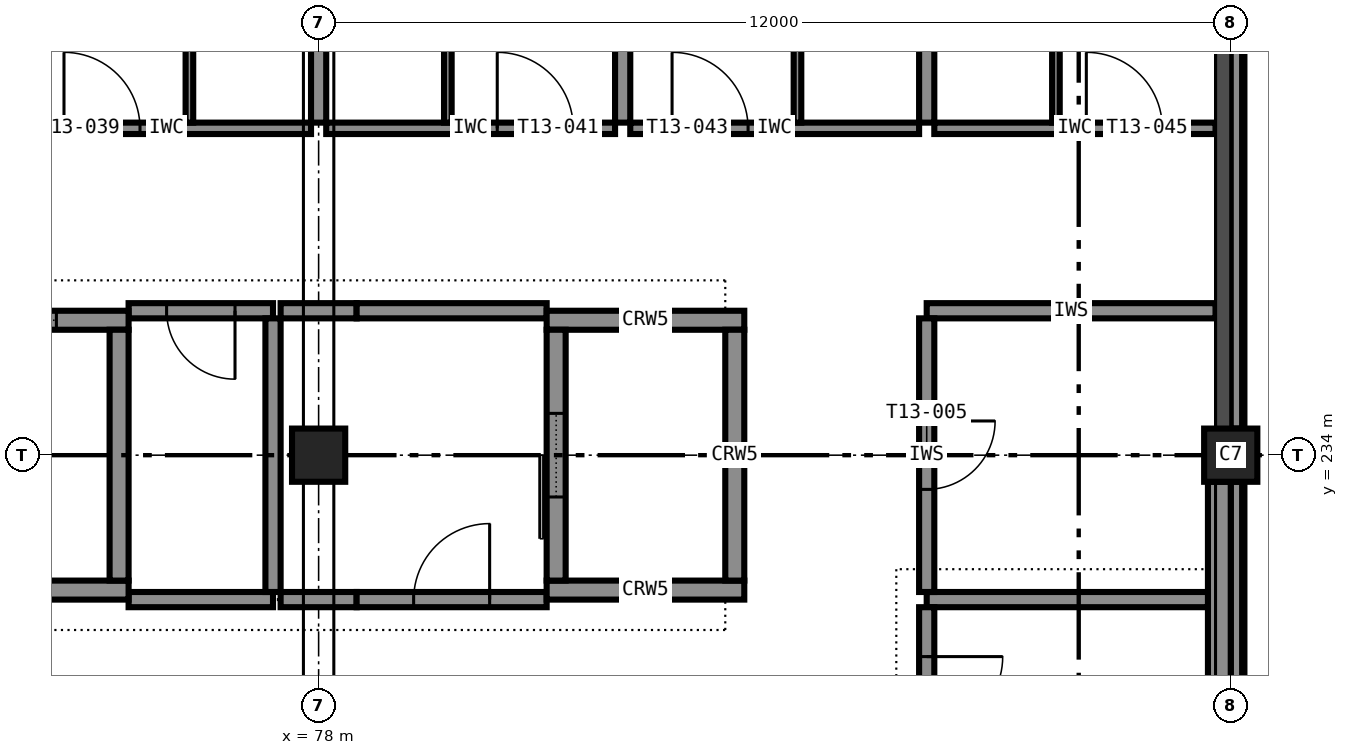
"""IFC4 building model, lengths in metres.
Left out: names, types, materials, properties, quantities, classifications, styles, units other than length and angle.
Written with IfcOpenShell. Run it as: python <this file> out.ifc"""

import sys

from ifc_helpers import new_model, si_unit, direction, frame, frame_2d, origin, origin_2d, place, context, subcontext, project, spatial, rectangle, extrude, element, fill, save


model = new_model("IFC4")
c1 = context("Model", 3, precision=1e-05, world=origin(), true_north=direction((0.0, 1.0)))
c2 = subcontext(c1, "Body", "Model", "MODEL_VIEW")
j1 = project(units=[si_unit("LENGTHUNIT", "METRE"), si_unit("PLANEANGLEUNIT", "RADIAN")], contexts=[c1])
p1 = place(None, origin())
s1 = spatial("IfcSite", under=j1, at=p1, CompositionType="ELEMENT")
p2 = place(p1, origin())
s2 = spatial("IfcBuilding", under=s1, at=p2, CompositionType="ELEMENT")
p3 = place(p2, frame((0.0, 0.0, 53.4)))
s3 = spatial("IfcBuildingStorey", under=s2, at=p3, CompositionType="ELEMENT", Elevation=53.4)
for number, where, z_axis, x_axis in (
    (1, (78.0, 234.0, 0.0), (0.0, 0.0, 1.0), (1.0, 0.0, 0.0)),
    (2, (90.0, 234.0, 0.0), (0.0, 0.0, 1.0), (1.0, 0.0, 0.0)),
):
    element("IfcColumn", number, at=place(p3, frame(where, z_axis=z_axis, x_axis=x_axis)), inside=s3, PredefinedType="COLUMN", context=c2, shape_type="SweptSolid", body=[
        extrude(rectangle(XDim=0.7, YDim=0.7, at=origin_2d()), origin(), (0.0, 0.0, 1.0), 3.6),
    ])
p4 = place(p3, frame((72.5, 232.225, 0.0), z_axis=(0.0, 0.0, 1.0), x_axis=(1.0, 0.0, 0.0)))
e3 = element("IfcWall", 3, at=p4, inside=s3, PredefinedType="SHEAR", context=c2, shape_type="SweptSolid", body=[
    extrude(rectangle(XDim=3.0, YDim=0.25, at=frame_2d((1.5, 0.0))), origin(), (0.0, 0.0, 1.0), 3.6),
])
p5 = place(p3, frame((72.5, 235.775, 0.0), z_axis=(0.0, 0.0, 1.0), x_axis=(1.0, 0.0, 0.0)))
e4 = element("IfcWall", 4, at=p5, inside=s3, PredefinedType="SHEAR", context=c2, shape_type="SweptSolid", body=[
    extrude(rectangle(XDim=3.0, YDim=0.25, at=frame_2d((1.5, 0.0))), origin(), (0.0, 0.0, 1.0), 3.6),
])
p6 = place(p5, frame((0.95, 0.0, 0.0)))
e5 = element("IfcOpeningElement", 5, at=p6, cuts=e4, PredefinedType="OPENING", context=c2, shape_type="SweptSolid", body=[
    extrude(rectangle(XDim=1.1, YDim=2.1, at=frame_2d((0.55, 1.05))), frame((0.0, 0.135, 0.0), z_axis=(0.0, -1.0, 0.0), x_axis=(1.0, 0.0, 0.0)), (0.0, 0.0, 1.0), 0.27),
])
p7 = place(p3, frame((75.375, 232.35, 0.0), z_axis=(0.0, 0.0, 1.0), x_axis=(0.0, 1.0, 0.0)))
e6 = element("IfcWall", 6, at=p7, inside=s3, PredefinedType="SHEAR", context=c2, shape_type="SweptSolid", body=[
    extrude(rectangle(XDim=3.3, YDim=0.25, at=frame_2d((1.65, 0.0))), origin(), (0.0, 0.0, 1.0), 3.6),
])
for number, where, z_axis, x_axis in (
    (7, (81.0, 232.225, 0.0), (0.0, 0.0, 1.0), (1.0, 0.0, 0.0)),
    (8, (81.0, 235.775, 0.0), (0.0, 0.0, 1.0), (1.0, 0.0, 0.0)),
):
    element("IfcWall", number, at=place(p3, frame(where, z_axis=z_axis, x_axis=x_axis)), inside=s3, PredefinedType="SHEAR", context=c2, shape_type="SweptSolid", body=[
        extrude(rectangle(XDim=2.6, YDim=0.25, at=frame_2d((1.3, 0.0))), origin(), (0.0, 0.0, 1.0), 3.6),
    ])
p8 = place(p3, frame((81.125, 232.35, 0.0), z_axis=(0.0, 0.0, 1.0), x_axis=(0.0, 1.0, 0.0)))
e9 = element("IfcWall", 9, at=p8, inside=s3, PredefinedType="SHEAR", context=c2, shape_type="SweptSolid", body=[
    extrude(rectangle(XDim=3.3, YDim=0.25, at=frame_2d((1.65, 0.0))), origin(), (0.0, 0.0, 1.0), 3.6),
])
p9 = place(p8, frame((1.1, 0.0, 0.0)))
e10 = element("IfcOpeningElement", 10, at=p9, cuts=e9, PredefinedType="OPENING", context=c2, shape_type="SweptSolid", body=[
    extrude(rectangle(XDim=1.1, YDim=2.1, at=frame_2d((0.55, 1.05))), frame((0.0, 0.135, 0.0), z_axis=(0.0, -1.0, 0.0), x_axis=(1.0, 0.0, 0.0)), (0.0, 0.0, 1.0), 0.27),
])
p10 = place(p3, frame((83.475, 232.35, 0.0), z_axis=(0.0, 0.0, 1.0), x_axis=(0.0, 1.0, 0.0)))
e11 = element("IfcWall", 11, at=p10, inside=s3, PredefinedType="SHEAR", context=c2, shape_type="SweptSolid", body=[
    extrude(rectangle(XDim=3.3, YDim=0.25, at=frame_2d((1.65, 0.0))), origin(), (0.0, 0.0, 1.0), 3.6),
])
p11 = place(p3, frame((89.85, 222.35, 0.0), z_axis=(0.0, 0.0, 1.0), x_axis=(0.0, 1.0, 0.0)))
e12 = element("IfcWall", 12, at=p11, inside=s3, PredefinedType="STANDARD", context=c2, shape_type="SweptSolid", body=[
    extrude(rectangle(XDim=11.3, YDim=0.3, at=frame_2d((5.65, 0.0))), origin(), (0.0, 0.0, 1.0), 2.6),
])
for number, where, z_axis, x_axis in (
    (13, (90.075, 222.35, 3.4), (0.0, 0.0, 1.0), (0.0, 1.0, 0.0)),
    (14, (90.075, 234.35, 3.4), (0.0, 0.0, 1.0), (0.0, 1.0, 0.0)),
):
    element("IfcWall", number, at=place(p3, frame(where, z_axis=z_axis, x_axis=x_axis)), inside=s3, PredefinedType="STANDARD", context=c2, shape_type="SweptSolid", body=[
        extrude(rectangle(XDim=11.3, YDim=0.15, at=frame_2d((5.65, 0.0))), origin(), (0.0, 0.0, 1.0), 0.2),
    ])
p12 = place(p3, frame((75.5, 232.1, 0.0), z_axis=(0.0, 0.0, 1.0), x_axis=(1.0, 0.0, 0.0)))
e15 = element("IfcWall", 15, at=p12, inside=s3, PredefinedType="PARTITIONING", context=c2, shape_type="SweptSolid", body=[
    extrude(rectangle(XDim=1.9, YDim=0.2, at=frame_2d((0.95, 0.0))), origin(), (0.0, 0.0, 1.0), 3.4),
])
p13 = place(p3, frame((77.5, 232.1, 0.0), z_axis=(0.0, 0.0, 1.0), x_axis=(1.0, 0.0, 0.0)))
e16 = element("IfcWall", 16, at=p13, inside=s3, PredefinedType="PARTITIONING", context=c2, shape_type="SweptSolid", body=[
    extrude(rectangle(XDim=1.0, YDim=0.2, at=frame_2d((0.5, 0.0))), origin(), (0.0, 0.0, 1.0), 3.4),
])
p14 = place(p3, frame((78.5, 232.1, 0.0), z_axis=(0.0, 0.0, 1.0), x_axis=(1.0, 0.0, 0.0)))
e17 = element("IfcWall", 17, at=p14, inside=s3, PredefinedType="PARTITIONING", context=c2, shape_type="SweptSolid", body=[
    extrude(rectangle(XDim=2.5, YDim=0.2, at=frame_2d((1.25, 0.0))), origin(), (0.0, 0.0, 1.0), 3.4),
])
p15 = place(p14, frame((0.75, 0.0, 0.0)))
e18 = element("IfcOpeningElement", 18, at=p15, cuts=e17, PredefinedType="OPENING", context=c2, shape_type="SweptSolid", body=[
    extrude(rectangle(XDim=1.0, YDim=2.1, at=frame_2d((0.5, 1.05))), frame((0.0, 0.11, 0.0), z_axis=(0.0, -1.0, 0.0), x_axis=(1.0, 0.0, 0.0)), (0.0, 0.0, 1.0), 0.22),
])
p16 = place(p3, frame((86.0, 232.1, 0.0), z_axis=(0.0, 0.0, 1.0), x_axis=(1.0, 0.0, 0.0)))
e19 = element("IfcWall", 19, at=p16, inside=s3, PredefinedType="PARTITIONING", context=c2, shape_type="SweptSolid", body=[
    extrude(rectangle(XDim=3.7, YDim=0.2, at=frame_2d((1.85, 0.0))), origin(), (0.0, 0.0, 1.0), 3.4),
])
p17 = place(p3, frame((77.4, 235.9, 0.0), z_axis=(0.0, 0.0, 1.0), x_axis=(-1.0, 0.0, 0.0)))
e20 = element("IfcWall", 20, at=p17, inside=s3, PredefinedType="PARTITIONING", context=c2, shape_type="SweptSolid", body=[
    extrude(rectangle(XDim=1.9, YDim=0.2, at=frame_2d((0.95, 0.0))), origin(), (0.0, 0.0, 1.0), 3.4),
])
p18 = place(p17, frame((0.5, 0.0, 0.0)))
e21 = element("IfcOpeningElement", 21, at=p18, cuts=e20, PredefinedType="OPENING", context=c2, shape_type="SweptSolid", body=[
    extrude(rectangle(XDim=0.9, YDim=2.1, at=frame_2d((0.45, 1.05))), frame((0.0, 0.11, 0.0), z_axis=(0.0, -1.0, 0.0), x_axis=(1.0, 0.0, 0.0)), (0.0, 0.0, 1.0), 0.22),
])
p19 = place(p3, frame((77.5, 235.9, 0.0), z_axis=(0.0, 0.0, 1.0), x_axis=(1.0, 0.0, 0.0)))
e22 = element("IfcWall", 22, at=p19, inside=s3, PredefinedType="PARTITIONING", context=c2, shape_type="SweptSolid", body=[
    extrude(rectangle(XDim=1.0, YDim=0.2, at=frame_2d((0.5, 0.0))), origin(), (0.0, 0.0, 1.0), 3.4),
])
p20 = place(p3, frame((78.5, 235.9, 0.0), z_axis=(0.0, 0.0, 1.0), x_axis=(1.0, 0.0, 0.0)))
e23 = element("IfcWall", 23, at=p20, inside=s3, PredefinedType="PARTITIONING", context=c2, shape_type="SweptSolid", body=[
    extrude(rectangle(XDim=2.5, YDim=0.2, at=frame_2d((1.25, 0.0))), origin(), (0.0, 0.0, 1.0), 3.4),
])
p21 = place(p3, frame((86.0, 235.9, 0.0), z_axis=(0.0, 0.0, 1.0), x_axis=(1.0, 0.0, 0.0)))
e24 = element("IfcWall", 24, at=p21, inside=s3, PredefinedType="PARTITIONING", context=c2, shape_type="SweptSolid", body=[
    extrude(rectangle(XDim=3.8, YDim=0.2, at=frame_2d((1.9, 0.0))), origin(), (0.0, 0.0, 1.0), 3.4),
])
p22 = place(p3, frame((77.4, 232.2, 0.0), z_axis=(0.0, 0.0, 1.0), x_axis=(0.0, 1.0, 0.0)))
e25 = element("IfcWall", 25, at=p22, inside=s3, PredefinedType="PARTITIONING", context=c2, shape_type="SweptSolid", body=[
    extrude(rectangle(XDim=3.6, YDim=0.2, at=frame_2d((1.8, 0.0))), origin(), (0.0, 0.0, 1.0), 3.4),
])
p23 = place(p3, frame((86.0, 235.8, 0.0), z_axis=(0.0, 0.0, 1.0), x_axis=(0.0, -1.0, 0.0)))
e26 = element("IfcWall", 26, at=p23, inside=s3, PredefinedType="PARTITIONING", context=c2, shape_type="SweptSolid", body=[
    extrude(rectangle(XDim=3.6, YDim=0.2, at=frame_2d((1.8, 0.0))), origin(), (0.0, 0.0, 1.0), 3.4),
])
p24 = place(p23, frame((1.35, 0.0, 0.0)))
e27 = element("IfcOpeningElement", 27, at=p24, cuts=e26, PredefinedType="OPENING", context=c2, shape_type="SweptSolid", body=[
    extrude(rectangle(XDim=0.9, YDim=2.1, at=frame_2d((0.45, 1.05))), frame((0.0, 0.11, 0.0), z_axis=(0.0, -1.0, 0.0), x_axis=(1.0, 0.0, 0.0)), (0.0, 0.0, 1.0), 0.22),
])
p25 = place(p3, frame((86.0, 232.0, 0.0), z_axis=(0.0, 0.0, 1.0), x_axis=(0.0, -1.0, 0.0)))
e28 = element("IfcWall", 28, at=p25, inside=s3, PredefinedType="PARTITIONING", context=c2, shape_type="SweptSolid", body=[
    extrude(rectangle(XDim=2.3, YDim=0.2, at=frame_2d((1.15, 0.0))), origin(), (0.0, 0.0, 1.0), 3.4),
])
p26 = place(p25, frame((0.65, 0.0, 0.0)))
e29 = element("IfcOpeningElement", 29, at=p26, cuts=e28, PredefinedType="OPENING", context=c2, shape_type="SweptSolid", body=[
    extrude(rectangle(XDim=1.0, YDim=2.1, at=frame_2d((0.5, 1.05))), frame((0.0, 0.11, 0.0), z_axis=(0.0, -1.0, 0.0), x_axis=(1.0, 0.0, 0.0)), (0.0, 0.0, 1.0), 0.22),
])
p27 = place(p3, frame((74.1, 238.3, 0.0), z_axis=(0.0, 0.0, 1.0), x_axis=(1.0, 0.0, 0.0)))
e30 = element("IfcWall", 30, at=p27, inside=s3, PredefinedType="PARTITIONING", context=c2, shape_type="SweptSolid", body=[
    extrude(rectangle(XDim=3.8, YDim=0.15, at=frame_2d((1.9, 0.0))), origin(), (0.0, 0.0, 1.0), 3.4),
])
p28 = place(p27, frame((0.55, 0.0, 0.0)))
e31 = element("IfcOpeningElement", 31, at=p28, cuts=e30, PredefinedType="OPENING", context=c2, shape_type="SweptSolid", body=[
    extrude(rectangle(XDim=1.0, YDim=2.1, at=frame_2d((0.5, 1.05))), frame((0.0, 0.085, 0.0), z_axis=(0.0, -1.0, 0.0), x_axis=(1.0, 0.0, 0.0)), (0.0, 0.0, 1.0), 0.17),
])
p29 = place(p3, frame((76.3, 238.375, 0.0), z_axis=(0.0, 0.0, 1.0), x_axis=(0.0, 1.0, 0.0)))
e32 = element("IfcWall", 32, at=p29, inside=s3, PredefinedType="PARTITIONING", context=c2, shape_type="SweptSolid", body=[
    extrude(rectangle(XDim=2.875, YDim=0.1, at=frame_2d((1.438, 0.0))), origin(), (0.0, 0.0, 1.0), 3.4),
])
p30 = place(p29, frame((1.038, 0.0, 0.0)))
e33 = element("IfcOpeningElement", 33, at=p30, cuts=e32, PredefinedType="OPENING", context=c2, shape_type="SweptSolid", body=[
    extrude(rectangle(XDim=0.8, YDim=2.1, at=frame_2d((0.4, 1.05))), frame((0.0, 0.06, 0.0), z_axis=(0.0, -1.0, 0.0), x_axis=(1.0, 0.0, 0.0)), (0.0, 0.0, 1.0), 0.12),
])
p31 = place(p3, frame((78.1, 238.3, 0.0), z_axis=(0.0, 0.0, 1.0), x_axis=(1.0, 0.0, 0.0)))
e34 = element("IfcWall", 34, at=p31, inside=s3, PredefinedType="PARTITIONING", context=c2, shape_type="SweptSolid", body=[
    extrude(rectangle(XDim=3.8, YDim=0.15, at=frame_2d((1.9, 0.0))), origin(), (0.0, 0.0, 1.0), 3.4),
])
p32 = place(p31, frame((2.25, 0.0, 0.0)))
e35 = element("IfcOpeningElement", 35, at=p32, cuts=e34, PredefinedType="OPENING", context=c2, shape_type="SweptSolid", body=[
    extrude(rectangle(XDim=1.0, YDim=2.1, at=frame_2d((0.5, 1.05))), frame((0.0, 0.085, 0.0), z_axis=(0.0, -1.0, 0.0), x_axis=(1.0, 0.0, 0.0)), (0.0, 0.0, 1.0), 0.17),
])
p33 = place(p3, frame((79.7, 241.25, 0.0), z_axis=(0.0, 0.0, 1.0), x_axis=(0.0, -1.0, 0.0)))
e36 = element("IfcWall", 36, at=p33, inside=s3, PredefinedType="PARTITIONING", context=c2, shape_type="SweptSolid", body=[
    extrude(rectangle(XDim=2.875, YDim=0.1, at=frame_2d((1.438, 0.0))), origin(), (0.0, 0.0, 1.0), 3.4),
])
p34 = place(p33, frame((1.038, 0.0, 0.0)))
e37 = element("IfcOpeningElement", 37, at=p34, cuts=e36, PredefinedType="OPENING", context=c2, shape_type="SweptSolid", body=[
    extrude(rectangle(XDim=0.8, YDim=2.1, at=frame_2d((0.4, 1.05))), frame((0.0, 0.06, 0.0), z_axis=(0.0, -1.0, 0.0), x_axis=(1.0, 0.0, 0.0)), (0.0, 0.0, 1.0), 0.12),
])
p35 = place(p3, frame((82.1, 238.3, 0.0), z_axis=(0.0, 0.0, 1.0), x_axis=(1.0, 0.0, 0.0)))
e38 = element("IfcWall", 38, at=p35, inside=s3, PredefinedType="PARTITIONING", context=c2, shape_type="SweptSolid", body=[
    extrude(rectangle(XDim=3.8, YDim=0.15, at=frame_2d((1.9, 0.0))), origin(), (0.0, 0.0, 1.0), 3.4),
])
p36 = place(p35, frame((0.55, 0.0, 0.0)))
e39 = element("IfcOpeningElement", 39, at=p36, cuts=e38, PredefinedType="OPENING", context=c2, shape_type="SweptSolid", body=[
    extrude(rectangle(XDim=1.0, YDim=2.1, at=frame_2d((0.5, 1.05))), frame((0.0, 0.085, 0.0), z_axis=(0.0, -1.0, 0.0), x_axis=(1.0, 0.0, 0.0)), (0.0, 0.0, 1.0), 0.17),
])
p37 = place(p3, frame((84.3, 238.375, 0.0), z_axis=(0.0, 0.0, 1.0), x_axis=(0.0, 1.0, 0.0)))
e40 = element("IfcWall", 40, at=p37, inside=s3, PredefinedType="PARTITIONING", context=c2, shape_type="SweptSolid", body=[
    extrude(rectangle(XDim=2.875, YDim=0.1, at=frame_2d((1.438, 0.0))), origin(), (0.0, 0.0, 1.0), 3.4),
])
p38 = place(p37, frame((1.038, 0.0, 0.0)))
e41 = element("IfcOpeningElement", 41, at=p38, cuts=e40, PredefinedType="OPENING", context=c2, shape_type="SweptSolid", body=[
    extrude(rectangle(XDim=0.8, YDim=2.1, at=frame_2d((0.4, 1.05))), frame((0.0, 0.06, 0.0), z_axis=(0.0, -1.0, 0.0), x_axis=(1.0, 0.0, 0.0)), (0.0, 0.0, 1.0), 0.12),
])
p39 = place(p3, frame((86.1, 238.3, 0.0), z_axis=(0.0, 0.0, 1.0), x_axis=(1.0, 0.0, 0.0)))
e42 = element("IfcWall", 42, at=p39, inside=s3, PredefinedType="PARTITIONING", context=c2, shape_type="SweptSolid", body=[
    extrude(rectangle(XDim=3.7, YDim=0.15, at=frame_2d((1.85, 0.0))), origin(), (0.0, 0.0, 1.0), 3.4),
])
p40 = place(p39, frame((2.0, 0.0, 0.0)))
e43 = element("IfcOpeningElement", 43, at=p40, cuts=e42, PredefinedType="OPENING", context=c2, shape_type="SweptSolid", body=[
    extrude(rectangle(XDim=1.0, YDim=2.1, at=frame_2d((0.5, 1.05))), frame((0.0, 0.085, 0.0), z_axis=(0.0, -1.0, 0.0), x_axis=(1.0, 0.0, 0.0)), (0.0, 0.0, 1.0), 0.17),
])
p41 = place(p3, frame((87.7, 241.25, 0.0), z_axis=(0.0, 0.0, 1.0), x_axis=(0.0, -1.0, 0.0)))
e44 = element("IfcWall", 44, at=p41, inside=s3, PredefinedType="PARTITIONING", context=c2, shape_type="SweptSolid", body=[
    extrude(rectangle(XDim=2.875, YDim=0.1, at=frame_2d((1.438, 0.0))), origin(), (0.0, 0.0, 1.0), 3.4),
])
p42 = place(p41, frame((1.038, 0.0, 0.0)))
e45 = element("IfcOpeningElement", 45, at=p42, cuts=e44, PredefinedType="OPENING", context=c2, shape_type="SweptSolid", body=[
    extrude(rectangle(XDim=0.8, YDim=2.1, at=frame_2d((0.4, 1.05))), frame((0.0, 0.06, 0.0), z_axis=(0.0, -1.0, 0.0), x_axis=(1.0, 0.0, 0.0)), (0.0, 0.0, 1.0), 0.12),
])
p43 = place(p3, frame((78.0, 245.65, 0.0), z_axis=(0.0, 0.0, 1.0), x_axis=(0.0, -1.0, 0.0)))
e46 = element("IfcWall", 46, at=p43, inside=s3, PredefinedType="PARTITIONING", context=c2, shape_type="SweptSolid", body=[
    extrude(rectangle(XDim=7.275, YDim=0.2, at=frame_2d((3.637, 0.0))), origin(), (0.0, 0.0, 1.0), 2.6),
])
for number, where, z_axis, x_axis in (
    (47, (82.0, 245.7, 0.0), (0.0, 0.0, 1.0), (0.0, -1.0, 0.0)),
    (48, (86.0, 245.7, 0.0), (0.0, 0.0, 1.0), (0.0, -1.0, 0.0)),
):
    element("IfcWall", number, at=place(p3, frame(where, z_axis=z_axis, x_axis=x_axis)), inside=s3, PredefinedType="PARTITIONING", context=c2, shape_type="SweptSolid", body=[
        extrude(rectangle(XDim=7.325, YDim=0.2, at=frame_2d((3.663, 0.0))), origin(), (0.0, 0.0, 1.0), 3.4),
    ])
p44 = place(p18, origin())
e49 = element("IfcDoor", 49, at=p44, inside=s3, OperationType="SINGLE_SWING_LEFT", PredefinedType="DOOR", context=c2, shape_type="SweptSolid", body=[
    extrude(rectangle(XDim=0.9, YDim=2.1, at=frame_2d((0.45, 1.05))), frame((0.0, 0.025, 0.0), z_axis=(0.0, -1.0, 0.0), x_axis=(1.0, 0.0, 0.0)), (0.0, 0.0, 1.0), 0.05),
])
fill(e21, e49)
p45 = place(p15, origin())
e50 = element("IfcDoor", 50, at=p45, inside=s3, OperationType="SINGLE_SWING_RIGHT", PredefinedType="DOOR", context=c2, shape_type="SweptSolid", body=[
    extrude(rectangle(XDim=1.0, YDim=2.1, at=frame_2d((0.5, 1.05))), frame((0.0, 0.025, 0.0), z_axis=(0.0, -1.0, 0.0), x_axis=(1.0, 0.0, 0.0)), (0.0, 0.0, 1.0), 0.05),
])
fill(e18, e50)
p46 = place(p24, origin())
e51 = element("IfcDoor", 51, at=p46, inside=s3, OperationType="SINGLE_SWING_LEFT", PredefinedType="DOOR", context=c2, shape_type="SweptSolid", body=[
    extrude(rectangle(XDim=0.9, YDim=2.1, at=frame_2d((0.45, 1.05))), frame((0.0, 0.025, 0.0), z_axis=(0.0, -1.0, 0.0), x_axis=(1.0, 0.0, 0.0)), (0.0, 0.0, 1.0), 0.05),
])
fill(e27, e51)
p47 = place(p26, origin())
e52 = element("IfcDoor", 52, at=p47, inside=s3, OperationType="SINGLE_SWING_LEFT", PredefinedType="DOOR", context=c2, shape_type="SweptSolid", body=[
    extrude(rectangle(XDim=1.0, YDim=2.1, at=frame_2d((0.5, 1.05))), frame((0.0, 0.025, 0.0), z_axis=(0.0, -1.0, 0.0), x_axis=(1.0, 0.0, 0.0)), (0.0, 0.0, 1.0), 0.05),
])
fill(e29, e52)
p48 = place(p28, origin())
e53 = element("IfcDoor", 53, at=p48, inside=s3, OperationType="SINGLE_SWING_LEFT", PredefinedType="DOOR", context=c2, shape_type="SweptSolid", body=[
    extrude(rectangle(XDim=1.0, YDim=2.1, at=frame_2d((0.5, 1.05))), frame((0.0, 0.025, 0.0), z_axis=(0.0, -1.0, 0.0), x_axis=(1.0, 0.0, 0.0)), (0.0, 0.0, 1.0), 0.05),
])
fill(e31, e53)
p49 = place(p32, origin())
e54 = element("IfcDoor", 54, at=p49, inside=s3, OperationType="SINGLE_SWING_LEFT", PredefinedType="DOOR", context=c2, shape_type="SweptSolid", body=[
    extrude(rectangle(XDim=1.0, YDim=2.1, at=frame_2d((0.5, 1.05))), frame((0.0, 0.025, 0.0), z_axis=(0.0, -1.0, 0.0), x_axis=(1.0, 0.0, 0.0)), (0.0, 0.0, 1.0), 0.05),
])
fill(e35, e54)
p50 = place(p36, origin())
e55 = element("IfcDoor", 55, at=p50, inside=s3, OperationType="SINGLE_SWING_LEFT", PredefinedType="DOOR", context=c2, shape_type="SweptSolid", body=[
    extrude(rectangle(XDim=1.0, YDim=2.1, at=frame_2d((0.5, 1.05))), frame((0.0, 0.025, 0.0), z_axis=(0.0, -1.0, 0.0), x_axis=(1.0, 0.0, 0.0)), (0.0, 0.0, 1.0), 0.05),
])
fill(e39, e55)
p51 = place(p40, origin())
e56 = element("IfcDoor", 56, at=p51, inside=s3, OperationType="SINGLE_SWING_LEFT", PredefinedType="DOOR", context=c2, shape_type="SweptSolid", body=[
    extrude(rectangle(XDim=1.0, YDim=2.1, at=frame_2d((0.5, 1.05))), frame((0.0, 0.025, 0.0), z_axis=(0.0, -1.0, 0.0), x_axis=(1.0, 0.0, 0.0)), (0.0, 0.0, 1.0), 0.05),
])
fill(e43, e56)
p52 = place(p6, origin())
e57 = element("IfcDoor", 57, at=p52, inside=s3, OperationType="SLIDING_TO_LEFT", PredefinedType="DOOR", context=c2, shape_type="SweptSolid", body=[
    extrude(rectangle(XDim=1.1, YDim=2.1, at=frame_2d((0.55, 1.05))), frame((0.0, 0.025, 0.0), z_axis=(0.0, -1.0, 0.0), x_axis=(1.0, 0.0, 0.0)), (0.0, 0.0, 1.0), 0.05),
])
fill(e5, e57)
p53 = place(p9, origin())
e58 = element("IfcDoor", 58, at=p53, inside=s3, OperationType="SLIDING_TO_LEFT", PredefinedType="DOOR", context=c2, shape_type="SweptSolid", body=[
    extrude(rectangle(XDim=1.1, YDim=2.1, at=frame_2d((0.55, 1.05))), frame((0.0, 0.025, 0.0), z_axis=(0.0, -1.0, 0.0), x_axis=(1.0, 0.0, 0.0)), (0.0, 0.0, 1.0), 0.05),
])
fill(e10, e58)
save(model, sys.argv[1])
